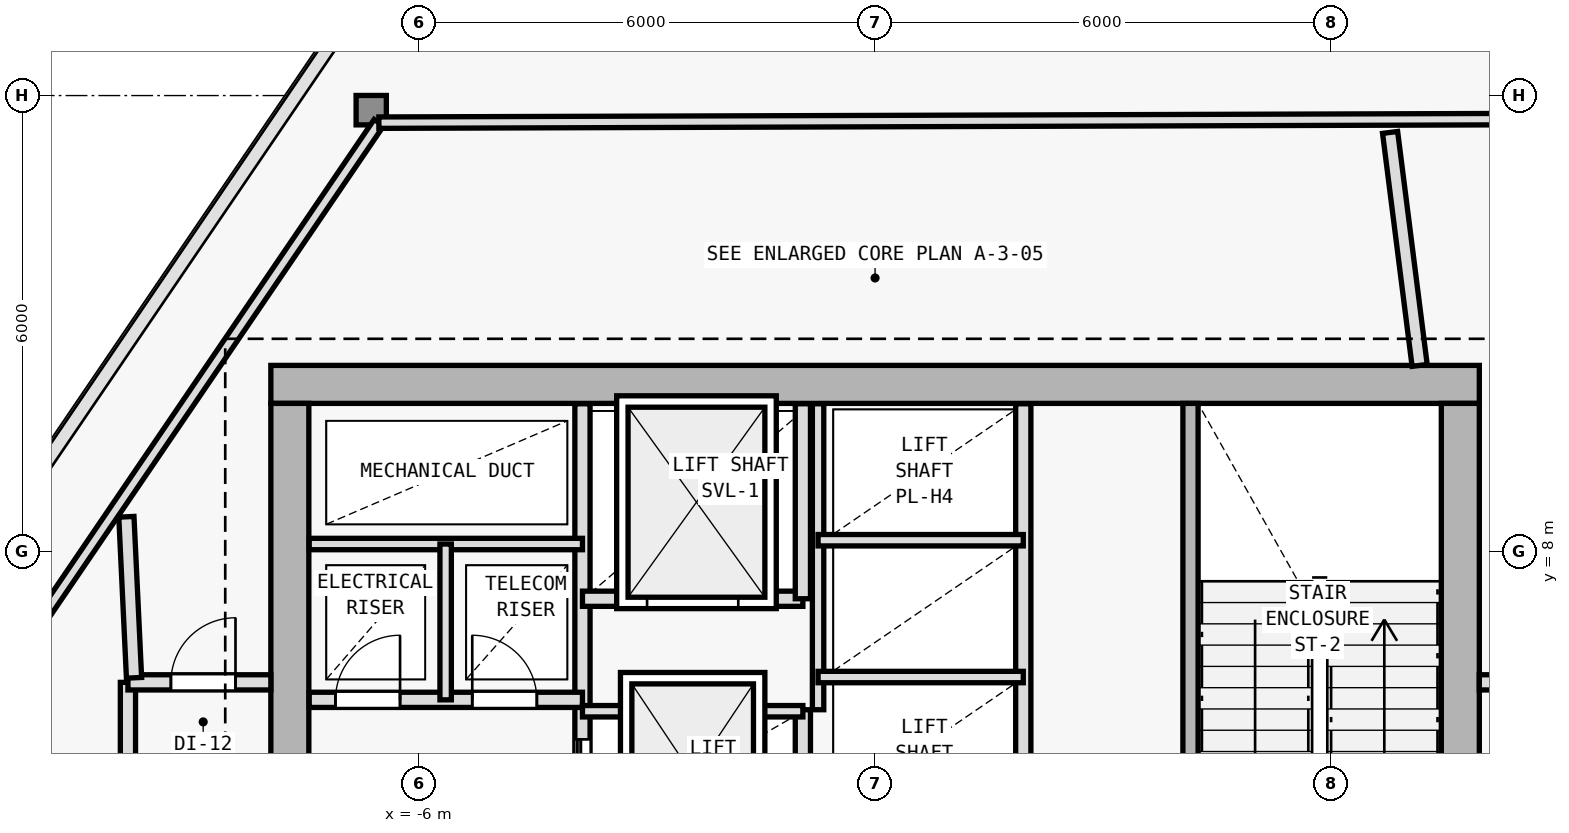
"""IFC4 building model, lengths in metres.
Left out: names, types, materials, properties, quantities, classifications, styles, units other than length and angle.
Written with IfcOpenShell. Run it as: python <this file> out.ifc"""

import sys

from ifc_helpers import new_model, si_unit, direction, frame, frame_2d, origin, origin_2d, place, context, subcontext, project, spatial, rectangle, i_section, extrude, element, fill, save


model = new_model("IFC4")
c1 = context("Model", 3, precision=1e-05, world=origin(), true_north=direction((0.0, 1.0)))
c2 = subcontext(c1, "Body", "Model", "MODEL_VIEW")
j1 = project(units=[si_unit("LENGTHUNIT", "METRE"), si_unit("PLANEANGLEUNIT", "RADIAN")], contexts=[c1])
p1 = place(None, origin())
s1 = spatial("IfcSite", under=j1, at=p1, CompositionType="ELEMENT")
p2 = place(p1, origin())
s2 = spatial("IfcBuilding", under=s1, at=p2, CompositionType="ELEMENT")
p3 = place(p2, frame((0.0, 0.0, 185.4)))
s3 = spatial("IfcBuildingStorey", under=s2, at=p3, CompositionType="ELEMENT", Elevation=185.4)
for number, where, z_axis, x_axis in (
    (1, (7.7, 10.2, 0.0), (0.0, 0.0, 1.0), (1.0, 0.0, 0.0)),
    (2, (-7.7, 10.2, 0.0), (0.0, 0.0, 1.0), (1.0, 0.0, 0.0)),
):
    element("IfcColumn", number, at=place(p3, frame(where, z_axis=z_axis, x_axis=x_axis)), inside=s3, PredefinedType="COLUMN", context=c2, shape_type="SweptSolid", body=[
        extrude(i_section(OverallWidth=0.404, OverallDepth=0.407, WebThickness=0.017, FlangeThickness=0.028, FilletRadius=0.015, at=origin_2d()), origin(), (0.0, 0.0, 1.0), 4.8),
    ])
p4 = place(p3, frame((-6.629, 13.808, 0.006), z_axis=(0.006627085102, -0.001937147953, 0.999976164316), x_axis=(0.280566991813, 0.959834445675, 0.0)))
e3 = element("IfcColumn", 3, at=p4, inside=s3, PredefinedType="COLUMN", context=c2, shape_type="SweptSolid", body=[
    extrude(i_section(OverallWidth=0.398, OverallDepth=0.387, WebThickness=0.013, FlangeThickness=0.022, FilletRadius=0.015, at=origin_2d()), origin(), (0.0, 0.0, 1.0), 4.789),
])
p5 = place(p3, frame((7.95, 10.2, 0.0), z_axis=(0.0, 0.0, 1.0), x_axis=(-1.0, 0.0, 0.0)))
e4 = element("IfcWall", 4, at=p5, inside=s3, PredefinedType="SHEAR", context=c2, shape_type="SweptSolid", body=[
    extrude(rectangle(XDim=15.9, YDim=0.5, at=frame_2d((7.95, 0.0))), origin(), (0.0, 0.0, 1.0), 4.5),
])
p6 = place(p3, frame((-7.7, -9.15, 0.0), z_axis=(0.0, 0.0, 1.0), x_axis=(0.0, 1.0, 0.0)))
e5 = element("IfcWall", 5, at=p6, inside=s3, PredefinedType="SHEAR", context=c2, shape_type="SweptSolid", body=[
    extrude(rectangle(XDim=19.1, YDim=0.5, at=frame_2d((9.55, 0.0))), origin(), (0.0, 0.0, 1.0), 4.5),
])
p7 = place(p6, frame((12.7, 0.0, 0.0)))
e6 = element("IfcOpeningElement", 6, at=p7, cuts=e5, PredefinedType="OPENING", context=c2, shape_type="SweptSolid", body=[
    extrude(rectangle(XDim=1.1, YDim=2.15, at=frame_2d((0.55, 1.075))), frame((0.0, 0.26, 0.0), z_axis=(0.0, -1.0, 0.0), x_axis=(1.0, 0.0, 0.0)), (0.0, 0.0, 1.0), 0.52),
])
p8 = place(p3, frame((7.7, 9.95, 0.0), z_axis=(0.0, 0.0, 1.0), x_axis=(0.0, -1.0, 0.0)))
e7 = element("IfcWall", 7, at=p8, inside=s3, PredefinedType="SHEAR", context=c2, shape_type="SweptSolid", body=[
    extrude(rectangle(XDim=19.1, YDim=0.5, at=frame_2d((9.55, 0.0))), origin(), (0.0, 0.0, 1.0), 4.5),
])
p9 = place(p3, frame((-3.85, 1.35, 0.0), z_axis=(0.0, 0.0, 1.0), x_axis=(0.0, 1.0, 0.0)))
e8 = element("IfcWall", 8, at=p9, inside=s3, PredefinedType="SOLIDWALL", context=c2, shape_type="SweptSolid", body=[
    extrude(rectangle(XDim=8.595, YDim=0.2, at=frame_2d((4.297, 0.0))), origin(), (0.0, 0.0, 1.0), 4.5),
])
p10 = place(p9, frame((1.5, 0.0, 0.0)))
e9 = element("IfcOpeningElement", 9, at=p10, cuts=e8, PredefinedType="OPENING", context=c2, shape_type="SweptSolid", body=[
    extrude(rectangle(XDim=1.0, YDim=2.15, at=frame_2d((0.5, 1.075))), frame((0.0, 0.11, 0.0), z_axis=(0.0, -1.0, 0.0), x_axis=(1.0, 0.0, 0.0)), (0.0, 0.0, 1.0), 0.22),
])
p11 = place(p9, frame((3.18, 0.0, 0.0)))
e10 = element("IfcOpeningElement", 10, at=p11, cuts=e8, PredefinedType="OPENING", context=c2, shape_type="SweptSolid", body=[
    extrude(rectangle(XDim=1.0, YDim=2.15, at=frame_2d((0.5, 1.075))), frame((0.0, 0.11, 0.0), z_axis=(0.0, -1.0, 0.0), x_axis=(1.0, 0.0, 0.0)), (0.0, 0.0, 1.0), 0.22),
])
p12 = place(p3, frame((-7.445, 6.05, 0.0), z_axis=(0.0, 0.0, 1.0), x_axis=(1.0, 0.0, 0.0)))
e11 = element("IfcWall", 11, at=p12, inside=s3, PredefinedType="SOLIDWALL", context=c2, shape_type="SweptSolid", body=[
    extrude(rectangle(XDim=3.595, YDim=0.2, at=frame_2d((1.797, 0.0))), origin(), (0.0, 0.0, 1.0), 4.5),
])
p13 = place(p12, frame((0.345, 0.0, 0.0)))
e12 = element("IfcOpeningElement", 12, at=p13, cuts=e11, PredefinedType="OPENING", context=c2, shape_type="SweptSolid", body=[
    extrude(rectangle(XDim=0.85, YDim=2.1, at=frame_2d((0.425, 1.05))), frame((0.0, 0.11, 0.0), z_axis=(0.0, -1.0, 0.0), x_axis=(1.0, 0.0, 0.0)), (0.0, 0.0, 1.0), 0.22),
])
p14 = place(p12, frame((2.145, 0.0, 0.0)))
e13 = element("IfcOpeningElement", 13, at=p14, cuts=e11, PredefinedType="OPENING", context=c2, shape_type="SweptSolid", body=[
    extrude(rectangle(XDim=0.85, YDim=2.1, at=frame_2d((0.425, 1.05))), frame((0.0, 0.11, 0.0), z_axis=(0.0, -1.0, 0.0), x_axis=(1.0, 0.0, 0.0)), (0.0, 0.0, 1.0), 0.22),
])
p15 = place(p3, frame((-7.445, 8.1, 0.0), z_axis=(0.0, 0.0, 1.0), x_axis=(1.0, 0.0, 0.0)))
e14 = element("IfcWall", 14, at=p15, inside=s3, PredefinedType="PARTITIONING", context=c2, shape_type="SweptSolid", body=[
    extrude(rectangle(XDim=3.595, YDim=0.15, at=frame_2d((1.797, 0.0))), origin(), (0.0, 0.0, 1.0), 4.5),
])
p16 = place(p3, frame((-5.65, 6.05, 0.0), z_axis=(0.0, 0.0, 1.0), x_axis=(0.0, 1.0, 0.0)))
e15 = element("IfcWall", 15, at=p16, inside=s3, PredefinedType="PARTITIONING", context=c2, shape_type="SweptSolid", body=[
    extrude(rectangle(XDim=2.05, YDim=0.15, at=frame_2d((1.025, 0.0))), origin(), (0.0, 0.0, 1.0), 4.5),
])
p17 = place(p3, frame((4.15, 2.75, 0.0), z_axis=(0.0, 0.0, 1.0), x_axis=(0.0, 1.0, 0.0)))
e16 = element("IfcWall", 16, at=p17, inside=s3, PredefinedType="SOLIDWALL", context=c2, shape_type="SweptSolid", body=[
    extrude(rectangle(XDim=7.2, YDim=0.2, at=frame_2d((3.6, 0.0))), origin(), (0.0, 0.0, 1.0), 4.5),
])
p18 = place(p17, frame((0.35, 0.0, 0.0)))
e17 = element("IfcOpeningElement", 17, at=p18, cuts=e16, PredefinedType="OPENING", context=c2, shape_type="SweptSolid", body=[
    extrude(rectangle(XDim=1.0, YDim=2.15, at=frame_2d((0.5, 1.075))), frame((0.0, 0.11, 0.0), z_axis=(0.0, -1.0, 0.0), x_axis=(1.0, 0.0, 0.0)), (0.0, 0.0, 1.0), 0.22),
])
p19 = place(p3, frame((-0.95, 2.65, 0.0), z_axis=(0.0, 0.0, 1.0), x_axis=(0.0, 1.0, 0.0)))
e18 = element("IfcWall", 18, at=p19, inside=s3, PredefinedType="SOLIDWALL", context=c2, shape_type="SweptSolid", body=[
    extrude(rectangle(XDim=3.27, YDim=0.2, at=frame_2d((1.635, 0.0))), origin(), (0.0, 0.0, 1.0), 4.5),
])
p20 = place(p3, frame((-3.85, 5.9, 0.0), z_axis=(0.0, 0.0, 1.0), x_axis=(1.0, 0.0, 0.0)))
e19 = element("IfcWall", 19, at=p20, inside=s3, PredefinedType="PARTITIONING", context=c2, shape_type="SweptSolid", body=[
    extrude(rectangle(XDim=2.9, YDim=0.15, at=frame_2d((1.45, 0.0))), origin(), (0.0, 0.0, 1.0), 4.5),
])
p21 = place(p3, frame((-3.85, 7.38, 0.0), z_axis=(0.0, 0.0, 1.0), x_axis=(1.0, 0.0, 0.0)))
e20 = element("IfcWall", 20, at=p21, inside=s3, PredefinedType="SOLIDWALL", context=c2, shape_type="SweptSolid", body=[
    extrude(rectangle(XDim=2.9, YDim=0.2, at=frame_2d((1.45, 0.0))), origin(), (0.0, 0.0, 1.0), 4.5),
])
p22 = place(p21, frame((0.85, 0.0, 0.0)))
e21 = element("IfcOpeningElement", 21, at=p22, cuts=e20, PredefinedType="OPENING", context=c2, shape_type="SweptSolid", body=[
    extrude(rectangle(XDim=1.2, YDim=2.2, at=frame_2d((0.6, 1.1))), frame((0.0, 0.11, 0.0), z_axis=(0.0, -1.0, 0.0), x_axis=(1.0, 0.0, 0.0)), (0.0, 0.0, 1.0), 0.22),
])
p23 = place(p3, frame((-0.95, 7.38, 0.0), z_axis=(0.0, 0.0, 1.0), x_axis=(0.0, 1.0, 0.0)))
e22 = element("IfcWall", 22, at=p23, inside=s3, PredefinedType="SOLIDWALL", context=c2, shape_type="SweptSolid", body=[
    extrude(rectangle(XDim=2.565, YDim=0.2, at=frame_2d((1.283, 0.0))), origin(), (0.0, 0.0, 1.0), 4.5),
])
p24 = place(p3, frame((1.95, 2.65, 0.0), z_axis=(0.0, 0.0, 1.0), x_axis=(0.0, 1.0, 0.0)))
e23 = element("IfcWall", 23, at=p24, inside=s3, PredefinedType="SOLIDWALL", context=c2, shape_type="SweptSolid", body=[
    extrude(rectangle(XDim=7.295, YDim=0.2, at=frame_2d((3.647, 0.0))), origin(), (0.0, 0.0, 1.0), 4.5),
])
p25 = place(p3, frame((-0.75, 5.92, 0.0), z_axis=(0.0, 0.0, 1.0), x_axis=(0.0, 1.0, 0.0)))
e24 = element("IfcWall", 24, at=p25, inside=s3, PredefinedType="PARTITIONING", context=c2, shape_type="SweptSolid", body=[
    extrude(rectangle(XDim=4.025, YDim=0.15, at=frame_2d((2.013, 0.0))), origin(), (0.0, 0.0, 1.0), 4.5),
])
for number, where, z_axis, x_axis in (
    (25, (-0.75, 6.35, 0.0), (0.0, 0.0, 1.0), (1.0, 0.0, 0.0)),
    (26, (-0.75, 8.15, 0.0), (0.0, 0.0, 1.0), (1.0, 0.0, 0.0)),
):
    element("IfcWall", number, at=place(p3, frame(where, z_axis=z_axis, x_axis=x_axis)), inside=s3, PredefinedType="PARTITIONING", context=c2, shape_type="SweptSolid", body=[
        extrude(rectangle(XDim=2.7, YDim=0.15, at=frame_2d((1.35, 0.0))), origin(), (0.0, 0.0, 1.0), 4.5),
    ])
p26 = place(p3, frame((-13.39, 3.558, 0.0), z_axis=(0.0, 0.0, 1.0), x_axis=(0.562463299975, 0.826822251867, 0.0)))
e27 = element("IfcWall", 27, at=p26, inside=s3, PredefinedType="PARTITIONING", context=c2, shape_type="SweptSolid", body=[
    extrude(rectangle(XDim=12.198, YDim=0.15, at=frame_2d((6.099, 0.0))), origin(), (0.0, 0.0, 1.0), 4.085),
])
p27 = place(p3, frame((-6.529, 13.644, 0.0), z_axis=(0.0, 0.0, 1.0), x_axis=(0.999995127533, 0.003121683751, 0.0)))
e28 = element("IfcWall", 28, at=p27, inside=s3, PredefinedType="PARTITIONING", context=c2, shape_type="SweptSolid", body=[
    extrude(rectangle(XDim=15.485, YDim=0.15, at=frame_2d((7.743, 0.0))), origin(), (0.0, 0.0, 1.0), 4.085),
])
p28 = place(p3, frame((-9.83, -11.53, 0.0), z_axis=(0.0, 0.0, 1.0), x_axis=(0.0, 1.0, 0.0)))
e29 = element("IfcWall", 29, at=p28, inside=s3, PredefinedType="SOLIDWALL", context=c2, shape_type="SweptSolid", body=[
    extrude(rectangle(XDim=17.81, YDim=0.2, at=frame_2d((8.905, 0.0))), origin(), (0.0, 0.0, 1.0), 3.975),
])
p29 = place(p28, frame((12.197, 0.0, 0.0)))
e30 = element("IfcOpeningElement", 30, at=p29, cuts=e29, PredefinedType="OPENING", context=c2, shape_type="SweptSolid", body=[
    extrude(rectangle(XDim=1.0, YDim=2.15, at=frame_2d((0.5, 1.075))), frame((0.0, 0.11, 0.0), z_axis=(0.0, -1.0, 0.0), x_axis=(1.0, 0.0, 0.0)), (0.0, 0.0, 1.0), 0.22),
])
p30 = place(p28, frame((3.445, 0.0, 0.0)))
e31 = element("IfcOpeningElement", 31, at=p30, cuts=e29, PredefinedType="OPENING", context=c2, shape_type="SweptSolid", body=[
    extrude(rectangle(XDim=1.0, YDim=2.15, at=frame_2d((0.5, 1.075))), frame((0.0, 0.11, 0.0), z_axis=(0.0, -1.0, 0.0), x_axis=(1.0, 0.0, 0.0)), (0.0, 0.0, 1.0), 0.22),
])
p31 = place(p3, frame((-9.83, 6.28, 0.0), z_axis=(0.0, 0.0, 1.0), x_axis=(1.0, 0.0, 0.0)))
e32 = element("IfcWall", 32, at=p31, inside=s3, PredefinedType="SOLIDWALL", context=c2, shape_type="SweptSolid", body=[
    extrude(rectangle(XDim=1.88, YDim=0.2, at=frame_2d((0.94, 0.0))), origin(), (0.0, 0.0, 1.0), 4.5),
])
p32 = place(p31, frame((0.565, 0.0, 0.0)))
e33 = element("IfcOpeningElement", 33, at=p32, cuts=e32, PredefinedType="OPENING", context=c2, shape_type="SweptSolid", body=[
    extrude(rectangle(XDim=0.85, YDim=2.1, at=frame_2d((0.425, 1.05))), frame((0.0, 0.11, 0.0), z_axis=(0.0, -1.0, 0.0), x_axis=(1.0, 0.0, 0.0)), (0.0, 0.0, 1.0), 0.22),
])
p33 = place(p3, frame((7.95, 6.28, 0.0), z_axis=(0.0, 0.0, 1.0), x_axis=(1.0, 0.0, 0.0)))
e34 = element("IfcWall", 34, at=p33, inside=s3, PredefinedType="SOLIDWALL", context=c2, shape_type="SweptSolid", body=[
    extrude(rectangle(XDim=1.88, YDim=0.2, at=frame_2d((0.94, 0.0))), origin(), (0.0, 0.0, 1.0), 3.975),
])
p34 = place(p33, frame((0.355, 0.0, 0.0)))
e35 = element("IfcOpeningElement", 35, at=p34, cuts=e34, PredefinedType="OPENING", context=c2, shape_type="SweptSolid", body=[
    extrude(rectangle(XDim=0.85, YDim=2.1, at=frame_2d((0.425, 1.05))), frame((0.0, 0.11, 0.0), z_axis=(0.0, -1.0, 0.0), x_axis=(1.0, 0.0, 0.0)), (0.0, 0.0, 1.0), 0.22),
])
p35 = place(p3, frame((7.165, 10.45, 0.0), z_axis=(0.0, 0.0, 1.0), x_axis=(-0.125804652953, 0.992055033401, 0.0)))
e36 = element("IfcWall", 36, at=p35, inside=s3, PredefinedType="SOLIDWALL", context=c2, shape_type="SweptSolid", body=[
    extrude(rectangle(XDim=3.09, YDim=0.2, at=frame_2d((1.545, 0.0))), origin(), (0.0, 0.0, 1.0), 4.5),
])
p36 = place(p3, frame((-9.75, 6.34, 0.0), z_axis=(0.0, 0.0, 1.0), x_axis=(-0.04742841437, 0.998874639537, 0.0)))
e37 = element("IfcWall", 37, at=p36, inside=s3, PredefinedType="SOLIDWALL", context=c2, shape_type="SweptSolid", body=[
    extrude(rectangle(XDim=2.121, YDim=0.2, at=frame_2d((1.061, 0.0))), origin(), (0.0, 0.0, 1.0), 4.5),
])
p37 = place(p13, origin())
e38 = element("IfcDoor", 38, at=p37, inside=s3, OperationType="SINGLE_SWING_RIGHT", PredefinedType="DOOR", context=c2, shape_type="SweptSolid", body=[
    extrude(rectangle(XDim=0.85, YDim=2.1, at=frame_2d((0.425, 1.05))), frame((0.0, 0.025, 0.0), z_axis=(0.0, -1.0, 0.0), x_axis=(1.0, 0.0, 0.0)), (0.0, 0.0, 1.0), 0.05),
])
fill(e12, e38)
p38 = place(p14, origin())
e39 = element("IfcDoor", 39, at=p38, inside=s3, OperationType="SINGLE_SWING_LEFT", PredefinedType="DOOR", context=c2, shape_type="SweptSolid", body=[
    extrude(rectangle(XDim=0.85, YDim=2.1, at=frame_2d((0.425, 1.05))), frame((0.0, 0.025, 0.0), z_axis=(0.0, -1.0, 0.0), x_axis=(1.0, 0.0, 0.0)), (0.0, 0.0, 1.0), 0.05),
])
fill(e13, e39)
p39 = place(p22, origin())
e40 = element("IfcDoor", 40, at=p39, inside=s3, OperationType="DOUBLE_DOOR_SLIDING", PredefinedType="DOOR", context=c2, shape_type="SweptSolid", body=[
    extrude(rectangle(XDim=1.2, YDim=2.2, at=frame_2d((0.6, 1.1))), frame((0.0, 0.025, 0.0), z_axis=(0.0, -1.0, 0.0), x_axis=(1.0, 0.0, 0.0)), (0.0, 0.0, 1.0), 0.05),
])
fill(e21, e40)
p40 = place(p11, origin())
e41 = element("IfcDoor", 41, at=p40, inside=s3, OperationType="DOUBLE_DOOR_SLIDING", PredefinedType="DOOR", context=c2, shape_type="SweptSolid", body=[
    extrude(rectangle(XDim=1.0, YDim=2.15, at=frame_2d((0.5, 1.075))), frame((0.0, 0.025, 0.0), z_axis=(0.0, -1.0, 0.0), x_axis=(1.0, 0.0, 0.0)), (0.0, 0.0, 1.0), 0.05),
])
fill(e10, e41)
p41 = place(p32, origin())
e42 = element("IfcDoor", 42, at=p41, inside=s3, OperationType="SINGLE_SWING_RIGHT", PredefinedType="DOOR", context=c2, shape_type="SweptSolid", body=[
    extrude(rectangle(XDim=0.85, YDim=2.1, at=frame_2d((0.425, 1.05))), frame((0.0, 0.025, 0.0), z_axis=(0.0, -1.0, 0.0), x_axis=(1.0, 0.0, 0.0)), (0.0, 0.0, 1.0), 0.05),
])
fill(e33, e42)
save(model, sys.argv[1])
